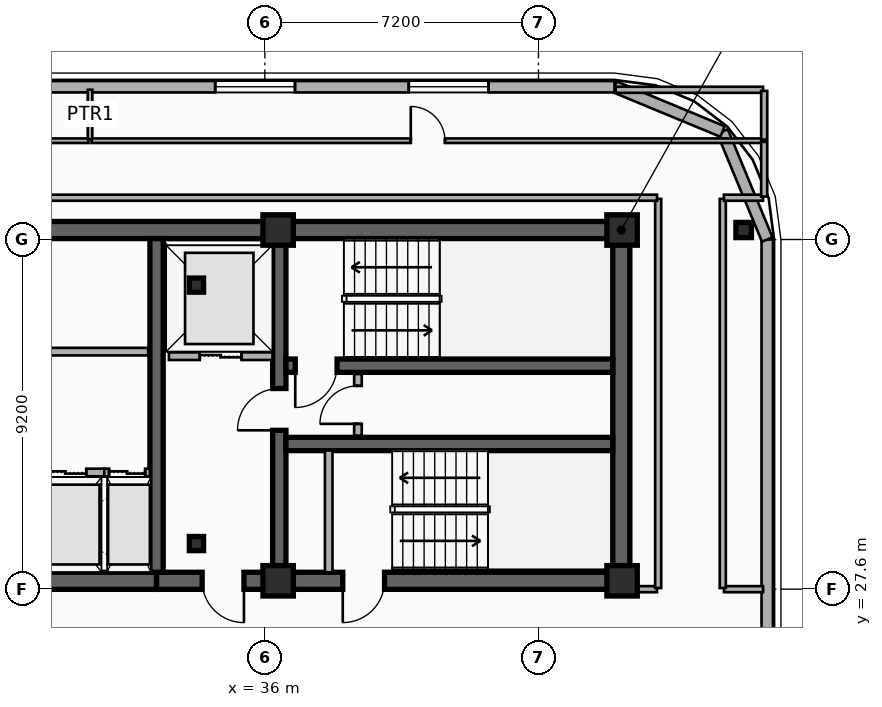
"""IFC4 building model, lengths in metres.
Left out: names, types, materials, properties, quantities, classifications, styles, units other than length and angle.
Written with IfcOpenShell. Run it as: python <this file> out.ifc"""

import sys

from ifc_helpers import new_model, si_unit, direction, frame, frame_2d, origin, origin_2d, place, context, subcontext, project, spatial, rectangle, i_section, extrude, element, fill, save


model = new_model("IFC4")
c1 = context("Model", 3, precision=1e-05, world=origin(), true_north=direction((0.0, 1.0)))
c2 = subcontext(c1, "Body", "Model", "MODEL_VIEW")
j1 = project(units=[si_unit("LENGTHUNIT", "METRE"), si_unit("PLANEANGLEUNIT", "RADIAN")], contexts=[c1])
p1 = place(None, origin())
s1 = spatial("IfcSite", under=j1, at=p1, CompositionType="ELEMENT")
p2 = place(p1, origin())
s2 = spatial("IfcBuilding", under=s1, at=p2, CompositionType="ELEMENT")
p3 = place(p2, frame((0.0, 0.0, 269.5)))
s3 = spatial("IfcBuildingStorey", under=s2, at=p3, CompositionType="ELEMENT", Elevation=269.5)
p4 = place(p3, frame((12.15, 37.05, 0.0), z_axis=(0.0, 0.0, 1.0), x_axis=(1.0, 0.0, 0.0)))
e1 = element("IfcWall", 1, at=p4, inside=s3, PredefinedType="SHEAR", context=c2, shape_type="SweptSolid", body=[
    extrude(rectangle(XDim=33.23, YDim=0.45, at=frame_2d((16.615, 0.0))), origin(), (0.0, 0.0, 1.0), 3.7),
])
p5 = place(p3, frame((33.15, 27.82, 0.0), z_axis=(0.0, 0.0, 1.0), x_axis=(-1.0, 0.0, 0.0)))
e2 = element("IfcWall", 2, at=p5, inside=s3, PredefinedType="SHEAR", context=c2, shape_type="SweptSolid", body=[
    extrude(rectangle(XDim=11.97, YDim=0.45, at=frame_2d((5.985, 0.0))), origin(), (0.0, 0.0, 1.0), 3.7),
])
p6 = place(p5, frame((6.1, 0.0, 0.0)))
e3 = element("IfcOpeningElement", 3, at=p6, cuts=e2, PredefinedType="OPENING", context=c2, shape_type="SweptSolid", body=[
    extrude(rectangle(XDim=1.6, YDim=2.2, at=frame_2d((0.8, 1.1))), frame((0.0, 0.235, 0.0), z_axis=(0.0, -1.0, 0.0), x_axis=(1.0, 0.0, 0.0)), (0.0, 0.0, 1.0), 0.47),
])
p7 = place(p3, frame((45.38, 27.82, 0.0), z_axis=(0.0, 0.0, 1.0), x_axis=(-1.0, 0.0, 0.0)))
e4 = element("IfcWall", 4, at=p7, inside=s3, PredefinedType="SHEAR", context=c2, shape_type="SweptSolid", body=[
    extrude(rectangle(XDim=12.23, YDim=0.45, at=frame_2d((6.115, 0.0))), origin(), (0.0, 0.0, 1.0), 3.7),
])
p8 = place(p7, frame((9.93, 0.0, 0.0)))
e5 = element("IfcOpeningElement", 5, at=p8, cuts=e4, PredefinedType="OPENING", context=c2, shape_type="SweptSolid", body=[
    extrude(rectangle(XDim=1.1, YDim=2.15, at=frame_2d((0.55, 1.075))), frame((0.0, 0.235, 0.0), z_axis=(0.0, -1.0, 0.0), x_axis=(1.0, 0.0, 0.0)), (0.0, 0.0, 1.0), 0.47),
])
p9 = place(p7, frame((6.23, 0.0, 0.0)))
e6 = element("IfcOpeningElement", 6, at=p9, cuts=e4, PredefinedType="OPENING", context=c2, shape_type="SweptSolid", body=[
    extrude(rectangle(XDim=1.1, YDim=2.15, at=frame_2d((0.55, 1.075))), frame((0.0, 0.235, 0.0), z_axis=(0.0, -1.0, 0.0), x_axis=(1.0, 0.0, 0.0)), (0.0, 0.0, 1.0), 0.47),
])
p10 = place(p3, frame((45.38, 28.045, 0.0), z_axis=(0.0, 0.0, 1.0), x_axis=(0.0, 1.0, 0.0)))
e7 = element("IfcWall", 7, at=p10, inside=s3, PredefinedType="SHEAR", context=c2, shape_type="SweptSolid", body=[
    extrude(rectangle(XDim=8.78, YDim=0.45, at=frame_2d((4.39, 0.0))), origin(), (0.0, 0.0, 1.0), 3.7),
])
p11 = place(p3, frame((33.15, 28.045, 0.0), z_axis=(0.0, 0.0, 1.0), x_axis=(0.0, 1.0, 0.0)))
e8 = element("IfcWall", 8, at=p11, inside=s3, PredefinedType="SHEAR", context=c2, shape_type="SweptSolid", body=[
    extrude(rectangle(XDim=8.78, YDim=0.35, at=frame_2d((4.39, 0.0))), origin(), (0.0, 0.0, 1.0), 3.7),
])
p12 = place(p3, frame((36.38, 28.045, 0.0), z_axis=(0.0, 0.0, 1.0), x_axis=(0.0, 1.0, 0.0)))
e9 = element("IfcWall", 9, at=p12, inside=s3, PredefinedType="SHEAR", context=c2, shape_type="SweptSolid", body=[
    extrude(rectangle(XDim=8.78, YDim=0.35, at=frame_2d((4.39, 0.0))), origin(), (0.0, 0.0, 1.0), 3.7),
])
p13 = place(p12, frame((3.735, 0.0, 0.0)))
e10 = element("IfcOpeningElement", 10, at=p13, cuts=e9, PredefinedType="OPENING", context=c2, shape_type="SweptSolid", body=[
    extrude(rectangle(XDim=1.1, YDim=2.15, at=frame_2d((0.55, 1.075))), frame((0.0, 0.185, 0.0), z_axis=(0.0, -1.0, 0.0), x_axis=(1.0, 0.0, 0.0)), (0.0, 0.0, 1.0), 0.37),
])
p14 = place(p3, frame((45.155, 33.48, 0.0), z_axis=(0.0, 0.0, 1.0), x_axis=(-1.0, 0.0, 0.0)))
e11 = element("IfcWall", 11, at=p14, inside=s3, PredefinedType="SHEAR", context=c2, shape_type="SweptSolid", body=[
    extrude(rectangle(XDim=8.6, YDim=0.35, at=frame_2d((4.3, 0.0))), origin(), (0.0, 0.0, 1.0), 3.7),
])
p15 = place(p14, frame((7.255, 0.0, 0.0)))
e12 = element("IfcOpeningElement", 12, at=p15, cuts=e11, PredefinedType="OPENING", context=c2, shape_type="SweptSolid", body=[
    extrude(rectangle(XDim=1.1, YDim=2.15, at=frame_2d((0.55, 1.075))), frame((0.0, 0.185, 0.0), z_axis=(0.0, -1.0, 0.0), x_axis=(1.0, 0.0, 0.0)), (0.0, 0.0, 1.0), 0.37),
])
p16 = place(p3, frame((36.555, 31.42, 0.0), z_axis=(0.0, 0.0, 1.0), x_axis=(1.0, 0.0, 0.0)))
e13 = element("IfcWall", 13, at=p16, inside=s3, PredefinedType="SHEAR", context=c2, shape_type="SweptSolid", body=[
    extrude(rectangle(XDim=8.6, YDim=0.35, at=frame_2d((4.3, 0.0))), origin(), (0.0, 0.0, 1.0), 3.7),
])
for number, where, z_axis, x_axis in (
    (14, (34.2, 28.8, 0.0), (0.0, 0.0, 1.0), (1.0, 0.0, 0.0)),
    (15, (34.2, 35.6, 0.0), (0.0, 0.0, 1.0), (1.0, 0.0, 0.0)),
):
    element("IfcColumn", number, at=place(p3, frame(where, z_axis=z_axis, x_axis=x_axis)), inside=s3, PredefinedType="COLUMN", context=c2, shape_type="SweptSolid", body=[
        extrude(i_section(OverallWidth=0.374, OverallDepth=0.372, WebThickness=0.017, FlangeThickness=0.027, FilletRadius=0.015, at=origin_2d()), origin(), (0.0, 0.0, 1.0), 3.7),
    ])
for number, where, z_axis, x_axis in (
    (16, (36.35, 27.82, 0.0), (0.0, 0.0, 1.0), (1.0, 0.0, 0.0)),
    (17, (36.35, 37.05, 0.0), (0.0, 0.0, 1.0), (1.0, 0.0, 0.0)),
    (18, (45.4, 27.82, 0.0), (0.0, 0.0, 1.0), (1.0, 0.0, 0.0)),
    (19, (45.4, 37.05, 0.0), (0.0, 0.0, 1.0), (1.0, 0.0, 0.0)),
):
    element("IfcColumn", number, at=place(p3, frame(where, z_axis=z_axis, x_axis=x_axis)), inside=s3, PredefinedType="COLUMN", context=c2, shape_type="SweptSolid", body=[
        extrude(rectangle(XDim=0.8, YDim=0.8, at=origin_2d()), origin(), (0.0, 0.0, 1.0), 3.7),
    ])
p17 = place(p3, frame((48.6, 37.05, 0.0), z_axis=(0.0, 0.0, 1.0), x_axis=(1.0, 0.0, 0.0)))
e20 = element("IfcColumn", 20, at=p17, inside=s3, PredefinedType="COLUMN", context=c2, shape_type="SweptSolid", body=[
    extrude(i_section(OverallWidth=0.408, OverallDepth=0.4, WebThickness=0.025, FlangeThickness=0.039, FilletRadius=0.015, at=origin_2d()), origin(), (0.0, 0.0, 1.0), 3.7),
])
p18 = place(p3, frame((49.22, 36.8, 0.0), z_axis=(0.0, 0.0, 1.0), x_axis=(0.0, -1.0, 0.0)))
e21 = element("IfcWall", 21, at=p18, inside=s3, PredefinedType="SOLIDWALL", context=c2, shape_type="SweptSolid", body=[
    extrude(rectangle(XDim=34.2, YDim=0.3, at=frame_2d((17.1, 0.0))), origin(), (0.0, 0.0, 1.0), 3.42),
])
p19 = place(p18, frame((25.775, 0.0, 0.75)))
e22 = element("IfcOpeningElement", 22, at=p19, cuts=e21, PredefinedType="OPENING", context=c2, shape_type="SweptSolid", body=[
    extrude(rectangle(XDim=2.1, YDim=2.1, at=frame_2d((1.05, 1.05))), frame((0.0, 0.16, 0.0), z_axis=(0.0, -1.0, 0.0), x_axis=(1.0, 0.0, 0.0)), (0.0, 0.0, 1.0), 0.32),
])
p20 = place(p18, frame((29.664, 0.0, 0.75)))
e23 = element("IfcOpeningElement", 23, at=p20, cuts=e21, PredefinedType="OPENING", context=c2, shape_type="SweptSolid", body=[
    extrude(rectangle(XDim=2.1, YDim=2.1, at=frame_2d((1.05, 1.05))), frame((0.0, 0.16, 0.0), z_axis=(0.0, -1.0, 0.0), x_axis=(1.0, 0.0, 0.0)), (0.0, 0.0, 1.0), 0.32),
])
for number, where, z_axis, x_axis in (
    (24, (48.042, 39.643, 0.0), (0.0, 0.0, 1.0), (0.383, -0.924, 0.0)),
    (25, (45.2, 40.82, 0.0), (0.0, 0.0, 1.0), (0.924, -0.383, 0.0)),
):
    element("IfcWall", number, at=place(p3, frame(where, z_axis=z_axis, x_axis=x_axis)), inside=s3, PredefinedType="SOLIDWALL", context=c2, shape_type="SweptSolid", body=[
        extrude(rectangle(XDim=3.077, YDim=0.3, at=frame_2d((1.538, 0.0))), origin(), (0.0, 0.0, 1.0), 3.42),
    ])
p21 = place(p3, frame((12.4, 40.82, 0.0), z_axis=(0.0, 0.0, 1.0), x_axis=(1.0, 0.0, 0.0)))
e26 = element("IfcWall", 26, at=p21, inside=s3, PredefinedType="SOLIDWALL", context=c2, shape_type="SweptSolid", body=[
    extrude(rectangle(XDim=32.8, YDim=0.3, at=frame_2d((16.4, 0.0))), origin(), (0.0, 0.0, 1.0), 3.42),
])
p22 = place(p21, frame((5.047, 0.0, 0.75)))
e27 = element("IfcOpeningElement", 27, at=p22, cuts=e26, PredefinedType="OPENING", context=c2, shape_type="SweptSolid", body=[
    extrude(rectangle(XDim=2.1, YDim=2.1, at=frame_2d((1.05, 1.05))), frame((0.0, 0.16, 0.0), z_axis=(0.0, -1.0, 0.0), x_axis=(1.0, 0.0, 0.0)), (0.0, 0.0, 1.0), 0.32),
])
p23 = place(p21, frame((11.873, 0.0, 0.75)))
e28 = element("IfcOpeningElement", 28, at=p23, cuts=e26, PredefinedType="OPENING", context=c2, shape_type="SweptSolid", body=[
    extrude(rectangle(XDim=2.1, YDim=2.1, at=frame_2d((1.05, 1.05))), frame((0.0, 0.16, 0.0), z_axis=(0.0, -1.0, 0.0), x_axis=(1.0, 0.0, 0.0)), (0.0, 0.0, 1.0), 0.32),
])
p24 = place(p21, frame((22.293, 0.0, 0.75)))
e29 = element("IfcOpeningElement", 29, at=p24, cuts=e26, PredefinedType="OPENING", context=c2, shape_type="SweptSolid", body=[
    extrude(rectangle(XDim=2.1, YDim=2.1, at=frame_2d((1.05, 1.05))), frame((0.0, 0.16, 0.0), z_axis=(0.0, -1.0, 0.0), x_axis=(1.0, 0.0, 0.0)), (0.0, 0.0, 1.0), 0.32),
])
p25 = place(p21, frame((27.387, 0.0, 0.75)))
e30 = element("IfcOpeningElement", 30, at=p25, cuts=e26, PredefinedType="OPENING", context=c2, shape_type="SweptSolid", body=[
    extrude(rectangle(XDim=2.1, YDim=2.1, at=frame_2d((1.05, 1.05))), frame((0.0, 0.16, 0.0), z_axis=(0.0, -1.0, 0.0), x_axis=(1.0, 0.0, 0.0)), (0.0, 0.0, 1.0), 0.32),
])
p26 = place(p3, frame((33.475, 33.73, 0.0), z_axis=(0.0, 0.0, 1.0), x_axis=(1.0, 0.0, 0.0)))
e31 = element("IfcWall", 31, at=p26, inside=s3, PredefinedType="PARTITIONING", context=c2, shape_type="SweptSolid", body=[
    extrude(rectangle(XDim=2.725, YDim=0.2, at=frame_2d((1.362, 0.0))), origin(), (0.0, 0.0, 1.0), 2.49),
])
p27 = place(p26, frame((0.812, 0.0, 0.0)))
e32 = element("IfcOpeningElement", 32, at=p27, cuts=e31, PredefinedType="OPENING", context=c2, shape_type="SweptSolid", body=[
    extrude(rectangle(XDim=1.1, YDim=2.15, at=frame_2d((0.55, 1.075))), frame((0.0, 0.11, 0.0), z_axis=(0.0, -1.0, 0.0), x_axis=(1.0, 0.0, 0.0)), (0.0, 0.0, 1.0), 0.22),
])
p28 = place(p3, frame((29.725, 30.67, 0.0), z_axis=(0.0, 0.0, 1.0), x_axis=(1.0, 0.0, 0.0)))
e33 = element("IfcWall", 33, at=p28, inside=s3, PredefinedType="PARTITIONING", context=c2, shape_type="SweptSolid", body=[
    extrude(rectangle(XDim=2.05, YDim=0.2, at=frame_2d((1.025, 0.0))), origin(), (0.0, 0.0, 1.0), 2.8),
])
p29 = place(p28, frame((0.475, 0.0, 0.0)))
e34 = element("IfcOpeningElement", 34, at=p29, cuts=e33, PredefinedType="OPENING", context=c2, shape_type="SweptSolid", body=[
    extrude(rectangle(XDim=1.1, YDim=2.15, at=frame_2d((0.55, 1.075))), frame((0.0, 0.11, 0.0), z_axis=(0.0, -1.0, 0.0), x_axis=(1.0, 0.0, 0.0)), (0.0, 0.0, 1.0), 0.22),
])
p30 = place(p3, frame((31.775, 30.67, 0.0), z_axis=(0.0, 0.0, 1.0), x_axis=(1.0, 0.0, 0.0)))
e35 = element("IfcWall", 35, at=p30, inside=s3, PredefinedType="PARTITIONING", context=c2, shape_type="SweptSolid", body=[
    extrude(rectangle(XDim=1.2, YDim=0.2, at=frame_2d((0.6, 0.0))), origin(), (0.0, 0.0, 1.0), 2.8),
])
p31 = place(p30, frame((0.125, 0.0, 0.0)))
e36 = element("IfcOpeningElement", 36, at=p31, cuts=e35, PredefinedType="OPENING", context=c2, shape_type="SweptSolid", body=[
    extrude(rectangle(XDim=0.95, YDim=2.15, at=frame_2d((0.475, 1.075))), frame((0.0, 0.11, 0.0), z_axis=(0.0, -1.0, 0.0), x_axis=(1.0, 0.0, 0.0)), (0.0, 0.0, 1.0), 0.22),
])
p32 = place(p3, frame((37.68, 28.045, 0.0), z_axis=(0.0, 0.0, 1.0), x_axis=(0.0, 1.0, 0.0)))
e37 = element("IfcWall", 37, at=p32, inside=s3, PredefinedType="PARTITIONING", context=c2, shape_type="SweptSolid", body=[
    extrude(rectangle(XDim=3.205, YDim=0.2, at=frame_2d((1.603, 0.0))), origin(), (0.0, 0.0, 1.0), 2.8),
])
p33 = place(p3, frame((38.45, 31.64, 0.0), z_axis=(0.0, 0.0, 1.0), x_axis=(0.0, 1.0, 0.0)))
e38 = element("IfcWall", 38, at=p33, inside=s3, PredefinedType="PARTITIONING", context=c2, shape_type="SweptSolid", body=[
    extrude(rectangle(XDim=1.62, YDim=0.2, at=frame_2d((0.81, 0.0))), origin(), (0.0, 0.0, 1.0), 3.42),
])
p34 = place(p33, frame((0.31, 0.0, 0.0)))
e39 = element("IfcOpeningElement", 39, at=p34, cuts=e38, PredefinedType="OPENING", context=c2, shape_type="SweptSolid", body=[
    extrude(rectangle(XDim=1.0, YDim=2.15, at=frame_2d((0.5, 1.075))), frame((0.0, 0.11, 0.0), z_axis=(0.0, -1.0, 0.0), x_axis=(1.0, 0.0, 0.0)), (0.0, 0.0, 1.0), 0.22),
])
p35 = place(p3, frame((21.59, 33.85, 0.0), z_axis=(0.0, 0.0, 1.0), x_axis=(1.0, 0.0, 0.0)))
e40 = element("IfcWall", 40, at=p35, inside=s3, PredefinedType="PARTITIONING", context=c2, shape_type="SweptSolid", body=[
    extrude(rectangle(XDim=11.34, YDim=0.2, at=frame_2d((5.67, 0.0))), origin(), (0.0, 0.0, 1.0), 2.49),
])
p36 = place(p35, frame((5.07, 0.0, 0.0)))
e41 = element("IfcOpeningElement", 41, at=p36, cuts=e40, PredefinedType="OPENING", context=c2, shape_type="SweptSolid", body=[
    extrude(rectangle(XDim=1.2, YDim=2.15, at=frame_2d((0.6, 1.075))), frame((0.0, 0.11, 0.0), z_axis=(0.0, -1.0, 0.0), x_axis=(1.0, 0.0, 0.0)), (0.0, 0.0, 1.0), 0.22),
])
p37 = place(p3, frame((8.46, 39.4, 0.0), z_axis=(0.0, 0.0, 1.0), x_axis=(1.0, 0.0, 0.0)))
e42 = element("IfcWall", 42, at=p37, inside=s3, PredefinedType="PARTITIONING", context=c2, shape_type="SweptSolid", body=[
    extrude(rectangle(XDim=22.9, YDim=0.12, at=frame_2d((11.45, 0.0))), origin(), (0.0, 0.0, 1.0), 3.42),
])
p38 = place(p37, frame((11.0, 0.0, 0.0)))
e43 = element("IfcOpeningElement", 43, at=p38, cuts=e42, PredefinedType="OPENING", context=c2, shape_type="SweptSolid", body=[
    extrude(rectangle(XDim=0.9, YDim=2.1, at=frame_2d((0.45, 1.05))), frame((0.0, 0.07, 0.0), z_axis=(0.0, -1.0, 0.0), x_axis=(1.0, 0.0, 0.0)), (0.0, 0.0, 1.0), 0.14),
])
p39 = place(p3, frame((31.44, 39.4, 0.0), z_axis=(0.0, 0.0, 1.0), x_axis=(1.0, 0.0, 0.0)))
e44 = element("IfcWall", 44, at=p39, inside=s3, PredefinedType="PARTITIONING", context=c2, shape_type="SweptSolid", body=[
    extrude(rectangle(XDim=17.7, YDim=0.12, at=frame_2d((8.85, 0.0))), origin(), (0.0, 0.0, 1.0), 3.42),
])
p40 = place(p39, frame((8.4, 0.0, 0.0)))
e45 = element("IfcOpeningElement", 45, at=p40, cuts=e44, PredefinedType="OPENING", context=c2, shape_type="SweptSolid", body=[
    extrude(rectangle(XDim=0.9, YDim=2.1, at=frame_2d((0.45, 1.05))), frame((0.0, 0.07, 0.0), z_axis=(0.0, -1.0, 0.0), x_axis=(1.0, 0.0, 0.0)), (0.0, 0.0, 1.0), 0.14),
])
p41 = place(p3, frame((31.4, 39.44, 0.0), z_axis=(0.0, 0.0, 1.0), x_axis=(0.0, 1.0, 0.0)))
e46 = element("IfcWall", 46, at=p41, inside=s3, PredefinedType="PARTITIONING", context=c2, shape_type="SweptSolid", body=[
    extrude(rectangle(XDim=1.3, YDim=0.12, at=frame_2d((0.65, 0.0))), origin(), (0.0, 0.0, 1.0), 3.42),
])
p42 = place(p3, frame((45.41, 27.6, 0.0), z_axis=(0.0, 0.0, 1.0), x_axis=(1.0, 0.0, 0.0)))
e47 = element("IfcWall", 47, at=p42, inside=s3, PredefinedType="PARTITIONING", context=c2, shape_type="SweptSolid", body=[
    extrude(rectangle(XDim=0.91, YDim=0.16, at=frame_2d((0.455, 0.0))), origin(), (0.0, 0.0, 1.0), 2.49),
])
p43 = place(p3, frame((48.08, 27.6, 0.0), z_axis=(0.0, 0.0, 1.0), x_axis=(1.0, 0.0, 0.0)))
e48 = element("IfcWall", 48, at=p43, inside=s3, PredefinedType="PARTITIONING", context=c2, shape_type="SweptSolid", body=[
    extrude(rectangle(XDim=1.03, YDim=0.16, at=frame_2d((0.515, 0.0))), origin(), (0.0, 0.0, 1.0), 3.42),
])
for number, where, z_axis, x_axis in (
    (49, (46.35, 27.63, 0.0), (0.0, 0.0, 1.0), (0.0, 1.0, 0.0)),
    (50, (48.05, 27.63, 0.0), (0.0, 0.0, 1.0), (0.0, 1.0, 0.0)),
):
    element("IfcWall", number, at=place(p3, frame(where, z_axis=z_axis, x_axis=x_axis)), inside=s3, PredefinedType="PARTITIONING", context=c2, shape_type="SweptSolid", body=[
        extrude(rectangle(XDim=10.24, YDim=0.16, at=frame_2d((5.12, 0.0))), origin(), (0.0, 0.0, 1.0), 2.9),
    ])
p44 = place(p3, frame((11.28, 37.9, 0.0), z_axis=(0.0, 0.0, 1.0), x_axis=(1.0, 0.0, 0.0)))
e51 = element("IfcWall", 51, at=p44, inside=s3, PredefinedType="PARTITIONING", context=c2, shape_type="SweptSolid", body=[
    extrude(rectangle(XDim=35.04, YDim=0.16, at=frame_2d((17.52, 0.0))), origin(), (0.0, 0.0, 1.0), 3.42),
])
p45 = place(p3, frame((48.08, 37.9, 0.0), z_axis=(0.0, 0.0, 1.0), x_axis=(1.0, 0.0, 0.0)))
e52 = element("IfcWall", 52, at=p45, inside=s3, PredefinedType="PARTITIONING", context=c2, shape_type="SweptSolid", body=[
    extrude(rectangle(XDim=1.03, YDim=0.16, at=frame_2d((0.515, 0.0))), origin(), (0.0, 0.0, 1.0), 3.42),
])
p46 = place(p3, frame((49.14, 37.93, 0.0), z_axis=(0.0, 0.0, 1.0), x_axis=(0.0, 1.0, 0.0)))
e53 = element("IfcWall", 53, at=p46, inside=s3, PredefinedType="PARTITIONING", context=c2, shape_type="SweptSolid", body=[
    extrude(rectangle(XDim=1.44, YDim=0.16, at=frame_2d((0.72, 0.0))), origin(), (0.0, 0.0, 1.0), 3.42),
])
p47 = place(p3, frame((45.23, 40.74, 0.0), z_axis=(0.0, 0.0, 1.0), x_axis=(1.0, 0.0, 0.0)))
e54 = element("IfcWall", 54, at=p47, inside=s3, PredefinedType="PARTITIONING", context=c2, shape_type="SweptSolid", body=[
    extrude(rectangle(XDim=3.88, YDim=0.16, at=frame_2d((1.94, 0.0))), origin(), (0.0, 0.0, 1.0), 3.42),
])
p48 = place(p3, frame((49.14, 39.43, 0.0), z_axis=(0.0, 0.0, 1.0), x_axis=(0.0, 1.0, 0.0)))
e55 = element("IfcWall", 55, at=p48, inside=s3, PredefinedType="PARTITIONING", context=c2, shape_type="SweptSolid", body=[
    extrude(rectangle(XDim=1.28, YDim=0.16, at=frame_2d((0.64, 0.0))), origin(), (0.0, 0.0, 1.0), 3.42),
])
p49 = place(p24, origin())
e56 = element("IfcWindow", 56, at=p49, inside=s3, PartitioningType="SINGLE_PANEL", PredefinedType="WINDOW", context=c2, shape_type="SweptSolid", body=[
    extrude(rectangle(XDim=2.1, YDim=2.1, at=frame_2d((1.05, 1.05))), frame((0.0, 0.03, 0.0), z_axis=(0.0, -1.0, 0.0), x_axis=(1.0, 0.0, 0.0)), (0.0, 0.0, 1.0), 0.06),
])
fill(e29, e56)
p50 = place(p25, origin())
e57 = element("IfcWindow", 57, at=p50, inside=s3, PartitioningType="SINGLE_PANEL", PredefinedType="WINDOW", context=c2, shape_type="SweptSolid", body=[
    extrude(rectangle(XDim=2.1, YDim=2.1, at=frame_2d((1.05, 1.05))), frame((0.0, 0.03, 0.0), z_axis=(0.0, -1.0, 0.0), x_axis=(1.0, 0.0, 0.0)), (0.0, 0.0, 1.0), 0.06),
])
fill(e30, e57)
p51 = place(p27, origin())
e58 = element("IfcDoor", 58, at=p51, inside=s3, OperationType="DOUBLE_DOOR_SLIDING", PredefinedType="DOOR", context=c2, shape_type="SweptSolid", body=[
    extrude(rectangle(XDim=1.1, YDim=2.15, at=frame_2d((0.55, 1.075))), frame((0.0, 0.025, 0.0), z_axis=(0.0, -1.0, 0.0), x_axis=(1.0, 0.0, 0.0)), (0.0, 0.0, 1.0), 0.05),
])
fill(e32, e58)
p52 = place(p29, origin())
e59 = element("IfcDoor", 59, at=p52, inside=s3, OperationType="DOUBLE_DOOR_SLIDING", PredefinedType="DOOR", context=c2, shape_type="SweptSolid", body=[
    extrude(rectangle(XDim=1.1, YDim=2.15, at=frame_2d((0.55, 1.075))), frame((0.0, 0.025, 0.0), z_axis=(0.0, -1.0, 0.0), x_axis=(1.0, 0.0, 0.0)), (0.0, 0.0, 1.0), 0.05),
])
fill(e34, e59)
p53 = place(p31, origin())
e60 = element("IfcDoor", 60, at=p53, inside=s3, OperationType="DOUBLE_DOOR_SLIDING", PredefinedType="DOOR", context=c2, shape_type="SweptSolid", body=[
    extrude(rectangle(XDim=0.95, YDim=2.15, at=frame_2d((0.475, 1.075))), frame((0.0, 0.025, 0.0), z_axis=(0.0, -1.0, 0.0), x_axis=(1.0, 0.0, 0.0)), (0.0, 0.0, 1.0), 0.05),
])
fill(e36, e60)
p54 = place(p15, origin())
e61 = element("IfcDoor", 61, at=p54, inside=s3, OperationType="SINGLE_SWING_RIGHT", PredefinedType="DOOR", context=c2, shape_type="SweptSolid", body=[
    extrude(rectangle(XDim=1.1, YDim=2.15, at=frame_2d((0.55, 1.075))), frame((0.0, 0.025, 0.0), z_axis=(0.0, -1.0, 0.0), x_axis=(1.0, 0.0, 0.0)), (0.0, 0.0, 1.0), 0.05),
])
fill(e12, e61)
p55 = place(p13, origin())
e62 = element("IfcDoor", 62, at=p55, inside=s3, OperationType="SINGLE_SWING_LEFT", PredefinedType="DOOR", context=c2, shape_type="SweptSolid", body=[
    extrude(rectangle(XDim=1.1, YDim=2.15, at=frame_2d((0.55, 1.075))), frame((0.0, 0.025, 0.0), z_axis=(0.0, -1.0, 0.0), x_axis=(1.0, 0.0, 0.0)), (0.0, 0.0, 1.0), 0.05),
])
fill(e10, e62)
p56 = place(p8, origin())
e63 = element("IfcDoor", 63, at=p56, inside=s3, OperationType="SINGLE_SWING_LEFT", PredefinedType="DOOR", context=c2, shape_type="SweptSolid", body=[
    extrude(rectangle(XDim=1.1, YDim=2.15, at=frame_2d((0.55, 1.075))), frame((0.0, 0.025, 0.0), z_axis=(0.0, -1.0, 0.0), x_axis=(1.0, 0.0, 0.0)), (0.0, 0.0, 1.0), 0.05),
])
fill(e5, e63)
p57 = place(p9, origin())
e64 = element("IfcDoor", 64, at=p57, inside=s3, OperationType="SINGLE_SWING_RIGHT", PredefinedType="DOOR", context=c2, shape_type="SweptSolid", body=[
    extrude(rectangle(XDim=1.1, YDim=2.15, at=frame_2d((0.55, 1.075))), frame((0.0, 0.025, 0.0), z_axis=(0.0, -1.0, 0.0), x_axis=(1.0, 0.0, 0.0)), (0.0, 0.0, 1.0), 0.05),
])
fill(e6, e64)
p58 = place(p34, origin())
e65 = element("IfcDoor", 65, at=p58, inside=s3, OperationType="SINGLE_SWING_LEFT", PredefinedType="DOOR", context=c2, shape_type="SweptSolid", body=[
    extrude(rectangle(XDim=1.0, YDim=2.15, at=frame_2d((0.5, 1.075))), frame((0.0, 0.025, 0.0), z_axis=(0.0, -1.0, 0.0), x_axis=(1.0, 0.0, 0.0)), (0.0, 0.0, 1.0), 0.05),
])
fill(e39, e65)
p59 = place(p40, origin())
e66 = element("IfcDoor", 66, at=p59, inside=s3, OperationType="SINGLE_SWING_LEFT", PredefinedType="DOOR", context=c2, shape_type="SweptSolid", body=[
    extrude(rectangle(XDim=0.9, YDim=2.1, at=frame_2d((0.45, 1.05))), frame((0.0, 0.025, 0.0), z_axis=(0.0, -1.0, 0.0), x_axis=(1.0, 0.0, 0.0)), (0.0, 0.0, 1.0), 0.05),
])
fill(e45, e66)
save(model, sys.argv[1])
